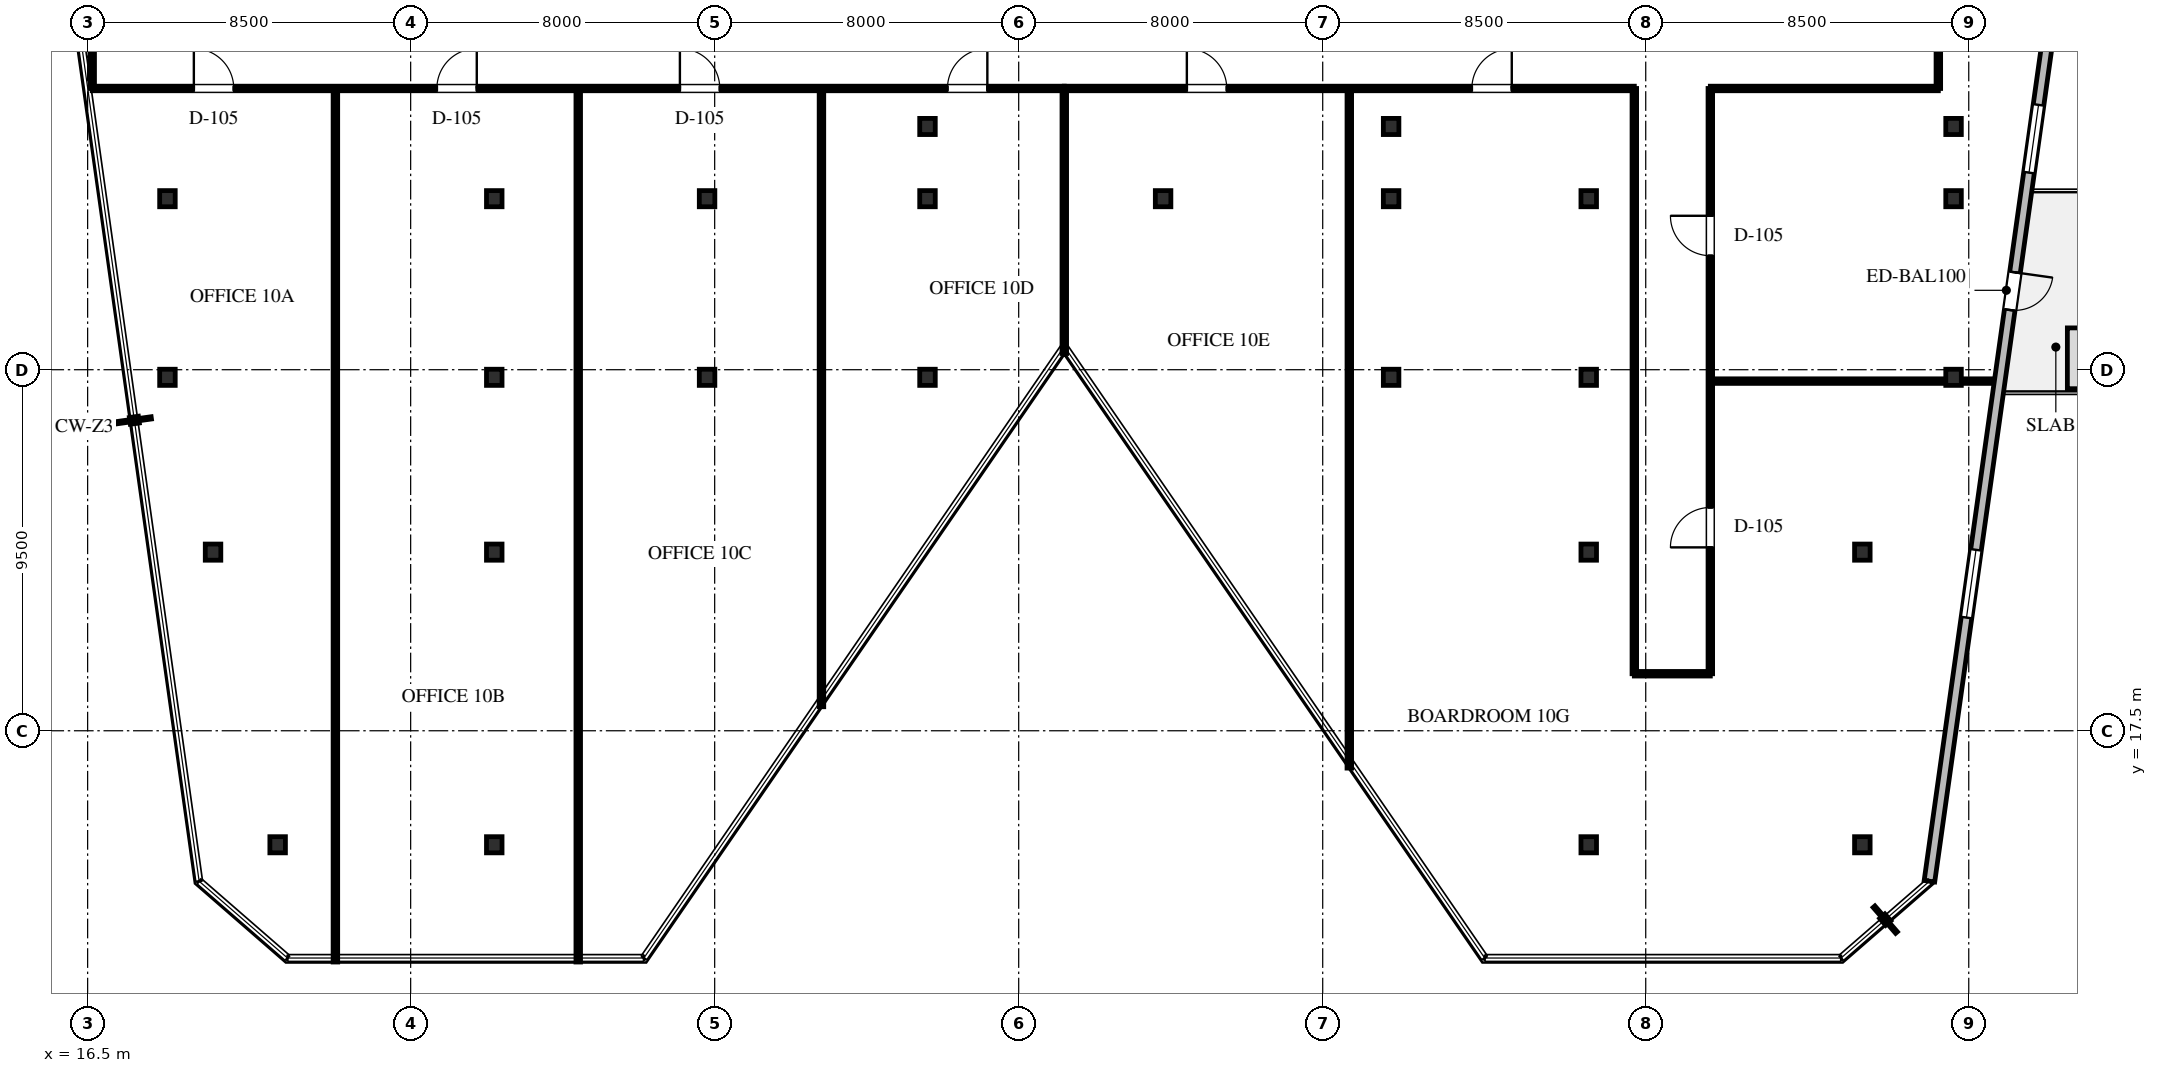
"""IFC4 building model, lengths in metres.
Left out: names, types, materials, properties, quantities, classifications, styles, units other than length and angle.
Written with IfcOpenShell. Run it as: python <this file> out.ifc"""

import sys

from ifc_helpers import new_model, si_unit, direction, frame, frame_2d, origin, origin_2d, place, context, subcontext, project, spatial, rectangle, i_section, extrude, element, fill, save


model = new_model("IFC4")
c1 = context("Model", 3, precision=1e-05, world=origin(), true_north=direction((0.0, 1.0)))
c2 = subcontext(c1, "Body", "Model", "MODEL_VIEW")
j1 = project(units=[si_unit("LENGTHUNIT", "METRE"), si_unit("PLANEANGLEUNIT", "RADIAN")], contexts=[c1])
p1 = place(None, origin())
s1 = spatial("IfcSite", under=j1, at=p1, CompositionType="ELEMENT")
p2 = place(p1, origin())
s2 = spatial("IfcBuilding", under=s1, at=p2, CompositionType="ELEMENT")
p3 = place(p2, frame((0.0, 0.0, 180.5)))
s3 = spatial("IfcBuildingStorey", under=s2, at=p3, CompositionType="ELEMENT", Elevation=180.5)
for number, where, z_axis, x_axis in (
    (1, (21.5, 14.5, 0.0), (0.0, 0.0, 1.0), (1.0, 0.0, 0.0)),
    (2, (18.6, 26.8, 0.0), (0.0, 0.0, 1.0), (1.0, 0.0, 0.0)),
    (3, (27.2, 26.8, 0.0), (0.0, 0.0, 1.0), (1.0, 0.0, 0.0)),
    (4, (32.8, 26.8, 0.0), (0.0, 0.0, 1.0), (1.0, 0.0, 0.0)),
    (5, (38.6, 26.8, 0.0), (0.0, 0.0, 1.0), (1.0, 0.0, 0.0)),
    (6, (50.8, 26.8, 0.0), (0.0, 0.0, 1.0), (1.0, 0.0, 0.0)),
    (7, (56.0, 26.8, 0.0), (0.0, 0.0, 1.0), (1.0, 0.0, 0.0)),
    (8, (65.6, 26.8, 0.0), (0.0, 0.0, 1.0), (1.0, 0.0, 0.0)),
    (9, (18.6, 31.5, 0.0), (0.0, 0.0, 1.0), (1.0, 0.0, 0.0)),
    (10, (27.2, 31.5, 0.0), (0.0, 0.0, 1.0), (1.0, 0.0, 0.0)),
    (11, (32.8, 31.5, 0.0), (0.0, 0.0, 1.0), (1.0, 0.0, 0.0)),
    (12, (27.2, 14.5, 0.0), (0.0, 0.0, 1.0), (1.0, 0.0, 0.0)),
    (13, (38.6, 31.5, 0.0), (0.0, 0.0, 1.0), (1.0, 0.0, 0.0)),
    (14, (44.8, 31.5, 0.0), (0.0, 0.0, 1.0), (1.0, 0.0, 0.0)),
    (15, (50.8, 31.5, 0.0), (0.0, 0.0, 1.0), (1.0, 0.0, 0.0)),
    (16, (56.0, 31.5, 0.0), (0.0, 0.0, 1.0), (1.0, 0.0, 0.0)),
    (17, (65.6, 31.5, 0.0), (0.0, 0.0, 1.0), (1.0, 0.0, 0.0)),
    (18, (56.0, 14.5, 0.0), (0.0, 0.0, 1.0), (1.0, 0.0, 0.0)),
    (19, (63.2, 14.5, 0.0), (0.0, 0.0, 1.0), (1.0, 0.0, 0.0)),
    (20, (19.8, 22.2, 0.0), (0.0, 0.0, 1.0), (1.0, 0.0, 0.0)),
    (21, (27.2, 22.2, 0.0), (0.0, 0.0, 1.0), (1.0, 0.0, 0.0)),
    (22, (56.0, 22.2, 0.0), (0.0, 0.0, 1.0), (1.0, 0.0, 0.0)),
    (23, (63.2, 22.2, 0.0), (0.0, 0.0, 1.0), (1.0, 0.0, 0.0)),
    (24, (38.6, 33.4, 0.0), (0.0, 0.0, 1.0), (1.0, 0.0, 0.0)),
    (25, (50.8, 33.4, 0.0), (0.0, 0.0, 1.0), (1.0, 0.0, 0.0)),
    (26, (65.6, 33.4, 0.0), (0.0, 0.0, 1.0), (1.0, 0.0, 0.0)),
):
    element("IfcColumn", number, at=place(p3, frame(where, z_axis=z_axis, x_axis=x_axis)), inside=s3, PredefinedType="COLUMN", context=c2, shape_type="SweptSolid", body=[
        extrude(i_section(OverallWidth=0.409, OverallDepth=0.425, WebThickness=0.033, FlangeThickness=0.052, FilletRadius=0.03, at=origin_2d()), origin(), (0.0, 0.0, 1.0), 4.0),
    ])
p4 = place(p3, frame((68.375, 37.8, 0.0), z_axis=(0.0, 0.0, 1.0), x_axis=(-0.139173290738, -0.99026804207, 0.0)))
e27 = element("IfcWall", 27, at=p4, inside=s3, PredefinedType="STANDARD", context=c2, shape_type="SweptSolid", body=[
    extrude(rectangle(XDim=24.498, YDim=0.28, at=frame_2d((12.249, 0.0))), origin(), (0.0, 0.0, 1.0), 3.755),
])
p5 = place(p4, frame((8.319, 0.0, 0.0)))
e28 = element("IfcOpeningElement", 28, at=p5, cuts=e27, PredefinedType="OPENING", context=c2, shape_type="SweptSolid", body=[
    extrude(rectangle(XDim=1.0, YDim=2.15, at=frame_2d((0.5, 1.075))), frame((0.0, 0.15, 0.0), z_axis=(0.0, -1.0, 0.0), x_axis=(1.0, 0.0, 0.0)), (0.0, 0.0, 1.0), 0.3),
])
p6 = place(p4, frame((3.869, 0.0, 0.65)))
e29 = element("IfcOpeningElement", 29, at=p6, cuts=e27, PredefinedType="OPENING", context=c2, shape_type="SweptSolid", body=[
    extrude(rectangle(XDim=1.8, YDim=2.1, at=frame_2d((0.9, 1.05))), frame((0.0, 0.15, 0.0), z_axis=(0.0, -1.0, 0.0), x_axis=(1.0, 0.0, 0.0)), (0.0, 0.0, 1.0), 0.3),
])
p7 = place(p4, frame((15.692, 0.0, 0.65)))
e30 = element("IfcOpeningElement", 30, at=p7, cuts=e27, PredefinedType="OPENING", context=c2, shape_type="SweptSolid", body=[
    extrude(rectangle(XDim=1.8, YDim=2.1, at=frame_2d((0.9, 1.05))), frame((0.0, 0.15, 0.0), z_axis=(0.0, -1.0, 0.0), x_axis=(1.0, 0.0, 0.0)), (0.0, 0.0, 1.0), 0.3),
])
p8 = place(p3, frame((16.62, 34.4, 0.0), z_axis=(0.0, 0.0, 1.0), x_axis=(1.0, 0.0, 0.0)))
e31 = element("IfcWall", 31, at=p8, inside=s3, PredefinedType="PARTITIONING", context=c2, shape_type="SweptSolid", body=[
    extrude(rectangle(XDim=25.58, YDim=0.12, at=frame_2d((12.79, 0.0))), origin(), (0.0, 0.0, 1.0), 2.982),
])
p9 = place(p8, frame((2.675, 0.0, 0.0)))
e32 = element("IfcOpeningElement", 32, at=p9, cuts=e31, PredefinedType="OPENING", context=c2, shape_type="SweptSolid", body=[
    extrude(rectangle(XDim=1.05, YDim=2.2, at=frame_2d((0.525, 1.1))), frame((0.0, 0.07, 0.0), z_axis=(0.0, -1.0, 0.0), x_axis=(1.0, 0.0, 0.0)), (0.0, 0.0, 1.0), 0.14),
])
p10 = place(p8, frame((9.07, 0.0, 0.0)))
e33 = element("IfcOpeningElement", 33, at=p10, cuts=e31, PredefinedType="OPENING", context=c2, shape_type="SweptSolid", body=[
    extrude(rectangle(XDim=1.05, YDim=2.2, at=frame_2d((0.525, 1.1))), frame((0.0, 0.07, 0.0), z_axis=(0.0, -1.0, 0.0), x_axis=(1.0, 0.0, 0.0)), (0.0, 0.0, 1.0), 0.14),
])
p11 = place(p8, frame((15.465, 0.0, 0.0)))
e34 = element("IfcOpeningElement", 34, at=p11, cuts=e31, PredefinedType="OPENING", context=c2, shape_type="SweptSolid", body=[
    extrude(rectangle(XDim=1.05, YDim=2.2, at=frame_2d((0.525, 1.1))), frame((0.0, 0.07, 0.0), z_axis=(0.0, -1.0, 0.0), x_axis=(1.0, 0.0, 0.0)), (0.0, 0.0, 1.0), 0.14),
])
p12 = place(p8, frame((22.505, 0.0, 0.0)))
e35 = element("IfcOpeningElement", 35, at=p12, cuts=e31, PredefinedType="OPENING", context=c2, shape_type="SweptSolid", body=[
    extrude(rectangle(XDim=1.05, YDim=2.2, at=frame_2d((0.525, 1.1))), frame((0.0, 0.07, 0.0), z_axis=(0.0, -1.0, 0.0), x_axis=(1.0, 0.0, 0.0)), (0.0, 0.0, 1.0), 0.14),
])
p13 = place(p3, frame((42.2, 34.4, 0.0), z_axis=(0.0, 0.0, 1.0), x_axis=(1.0, 0.0, 0.0)))
e36 = element("IfcWall", 36, at=p13, inside=s3, PredefinedType="PARTITIONING", context=c2, shape_type="SweptSolid", body=[
    extrude(rectangle(XDim=15.0, YDim=0.12, at=frame_2d((7.5, 0.0))), origin(), (0.0, 0.0, 1.0), 2.982),
])
p14 = place(p13, frame((3.225, 0.0, 0.0)))
e37 = element("IfcOpeningElement", 37, at=p14, cuts=e36, PredefinedType="OPENING", context=c2, shape_type="SweptSolid", body=[
    extrude(rectangle(XDim=1.05, YDim=2.2, at=frame_2d((0.525, 1.1))), frame((0.0, 0.07, 0.0), z_axis=(0.0, -1.0, 0.0), x_axis=(1.0, 0.0, 0.0)), (0.0, 0.0, 1.0), 0.14),
])
p15 = place(p13, frame((10.725, 0.0, 0.0)))
e38 = element("IfcOpeningElement", 38, at=p15, cuts=e36, PredefinedType="OPENING", context=c2, shape_type="SweptSolid", body=[
    extrude(rectangle(XDim=1.05, YDim=2.2, at=frame_2d((0.525, 1.1))), frame((0.0, 0.07, 0.0), z_axis=(0.0, -1.0, 0.0), x_axis=(1.0, 0.0, 0.0)), (0.0, 0.0, 1.0), 0.14),
])
p16 = place(p3, frame((59.2, 34.4, 0.0), z_axis=(0.0, 0.0, 1.0), x_axis=(1.0, 0.0, 0.0)))
e39 = element("IfcWall", 39, at=p16, inside=s3, PredefinedType="PARTITIONING", context=c2, shape_type="SweptSolid", body=[
    extrude(rectangle(XDim=6.0, YDim=0.12, at=frame_2d((3.0, 0.0))), origin(), (0.0, 0.0, 1.0), 3.755),
])
p17 = place(p3, frame((16.62, 34.4, 0.0), z_axis=(0.0, 0.0, 1.0), x_axis=(0.0, 1.0, 0.0)))
e40 = element("IfcWall", 40, at=p17, inside=s3, PredefinedType="PARTITIONING", context=c2, shape_type="SweptSolid", body=[
    extrude(rectangle(XDim=3.65, YDim=0.12, at=frame_2d((1.825, 0.0))), origin(), (0.0, 0.0, 1.0), 3.755),
])
p18 = place(p3, frame((65.2, 34.4, 0.0), z_axis=(0.0, 0.0, 1.0), x_axis=(0.0, 1.0, 0.0)))
e41 = element("IfcWall", 41, at=p18, inside=s3, PredefinedType="PARTITIONING", context=c2, shape_type="SweptSolid", body=[
    extrude(rectangle(XDim=3.317, YDim=0.12, at=frame_2d((1.659, 0.0))), origin(), (0.0, 0.0, 1.0), 2.982),
])
p19 = place(p3, frame((57.2, 19.0, 0.0), z_axis=(0.0, 0.0, 1.0), x_axis=(0.0, 1.0, 0.0)))
e42 = element("IfcWall", 42, at=p19, inside=s3, PredefinedType="PARTITIONING", context=c2, shape_type="SweptSolid", body=[
    extrude(rectangle(XDim=15.4, YDim=0.12, at=frame_2d((7.7, 0.0))), origin(), (0.0, 0.0, 1.0), 2.982),
])
p20 = place(p3, frame((59.2, 19.0, 0.0), z_axis=(0.0, 0.0, 1.0), x_axis=(0.0, 1.0, 0.0)))
e43 = element("IfcWall", 43, at=p20, inside=s3, PredefinedType="PARTITIONING", context=c2, shape_type="SweptSolid", body=[
    extrude(rectangle(XDim=15.4, YDim=0.12, at=frame_2d((7.7, 0.0))), origin(), (0.0, 0.0, 1.0), 2.982),
])
p21 = place(p20, frame((3.325, 0.0, 0.0)))
e44 = element("IfcOpeningElement", 44, at=p21, cuts=e43, PredefinedType="OPENING", context=c2, shape_type="SweptSolid", body=[
    extrude(rectangle(XDim=1.05, YDim=2.2, at=frame_2d((0.525, 1.1))), frame((0.0, 0.07, 0.0), z_axis=(0.0, -1.0, 0.0), x_axis=(1.0, 0.0, 0.0)), (0.0, 0.0, 1.0), 0.14),
])
p22 = place(p20, frame((11.0, 0.0, 0.0)))
e45 = element("IfcOpeningElement", 45, at=p22, cuts=e43, PredefinedType="OPENING", context=c2, shape_type="SweptSolid", body=[
    extrude(rectangle(XDim=1.05, YDim=2.2, at=frame_2d((0.525, 1.1))), frame((0.0, 0.07, 0.0), z_axis=(0.0, -1.0, 0.0), x_axis=(1.0, 0.0, 0.0)), (0.0, 0.0, 1.0), 0.14),
])
p23 = place(p3, frame((57.2, 19.0, 0.0), z_axis=(0.0, 0.0, 1.0), x_axis=(1.0, 0.0, 0.0)))
e46 = element("IfcWall", 46, at=p23, inside=s3, PredefinedType="PARTITIONING", context=c2, shape_type="SweptSolid", body=[
    extrude(rectangle(XDim=2.0, YDim=0.12, at=frame_2d((1.0, 0.0))), origin(), (0.0, 0.0, 1.0), 3.147),
])
p24 = place(p3, frame((59.268, 26.7, 0.0), z_axis=(0.0, 0.0, 1.0), x_axis=(1.0, 0.0, 0.0)))
e47 = element("IfcWall", 47, at=p24, inside=s3, PredefinedType="PARTITIONING", context=c2, shape_type="SweptSolid", body=[
    extrude(rectangle(XDim=7.38, YDim=0.12, at=frame_2d((3.69, 0.0))), origin(), (0.0, 0.0, 1.0), 2.982),
])
p25 = place(p3, frame((42.2, 27.427, 0.0), z_axis=(0.0, 0.0, 1.0), x_axis=(0.0, 1.0, 0.0)))
e48 = element("IfcWall", 48, at=p25, inside=s3, PredefinedType="PARTITIONING", context=c2, shape_type="SweptSolid", body=[
    extrude(rectangle(XDim=6.973, YDim=0.12, at=frame_2d((3.487, 0.0))), origin(), (0.0, 0.0, 1.0), 2.982),
])
for number, where, z_axis, x_axis in (
    (49, (23.02, 11.415, 0.0), (0.0, 0.0, 1.0), (0.0, 1.0, 0.0)),
    (50, (29.41, 11.415, 0.0), (0.0, 0.0, 1.0), (0.0, 1.0, 0.0)),
):
    element("IfcWall", number, at=place(p3, frame(where, z_axis=z_axis, x_axis=x_axis)), inside=s3, PredefinedType="PARTITIONING", context=c2, shape_type="SweptSolid", body=[
        extrude(rectangle(XDim=22.917, YDim=0.12, at=frame_2d((11.458, 0.0))), origin(), (0.0, 0.0, 1.0), 2.982),
    ])
p26 = place(p3, frame((35.81, 18.132, 0.0), z_axis=(0.0, 0.0, 1.0), x_axis=(0.0, 1.0, 0.0)))
e51 = element("IfcWall", 51, at=p26, inside=s3, PredefinedType="PARTITIONING", context=c2, shape_type="SweptSolid", body=[
    extrude(rectangle(XDim=16.2, YDim=0.12, at=frame_2d((8.1, 0.0))), origin(), (0.0, 0.0, 1.0), 2.982),
])
p27 = place(p3, frame((49.7, 16.517, 0.0), z_axis=(0.0, 0.0, 1.0), x_axis=(0.0, 1.0, 0.0)))
e52 = element("IfcWall", 52, at=p27, inside=s3, PredefinedType="PARTITIONING", context=c2, shape_type="SweptSolid", body=[
    extrude(rectangle(XDim=17.815, YDim=0.12, at=frame_2d((8.907, 0.0))), origin(), (0.0, 0.0, 1.0), 2.982),
])
p28 = place(p5, origin())
e53 = element("IfcDoor", 53, at=p28, inside=s3, OperationType="SINGLE_SWING_LEFT", PredefinedType="DOOR", context=c2, shape_type="SweptSolid", body=[
    extrude(rectangle(XDim=1.0, YDim=2.15, at=frame_2d((0.5, 1.075))), frame((0.0, 0.025, 0.0), z_axis=(0.0, -1.0, 0.0), x_axis=(1.0, 0.0, 0.0)), (0.0, 0.0, 1.0), 0.05),
])
fill(e28, e53)
p29 = place(p6, origin())
e54 = element("IfcWindow", 54, at=p29, inside=s3, PartitioningType="SINGLE_PANEL", PredefinedType="WINDOW", context=c2, shape_type="SweptSolid", body=[
    extrude(rectangle(XDim=1.8, YDim=2.1, at=frame_2d((0.9, 1.05))), frame((0.0, 0.03, 0.0), z_axis=(0.0, -1.0, 0.0), x_axis=(1.0, 0.0, 0.0)), (0.0, 0.0, 1.0), 0.06),
])
fill(e29, e54)
p30 = place(p7, origin())
e55 = element("IfcWindow", 55, at=p30, inside=s3, PartitioningType="SINGLE_PANEL", PredefinedType="WINDOW", context=c2, shape_type="SweptSolid", body=[
    extrude(rectangle(XDim=1.8, YDim=2.1, at=frame_2d((0.9, 1.05))), frame((0.0, 0.03, 0.0), z_axis=(0.0, -1.0, 0.0), x_axis=(1.0, 0.0, 0.0)), (0.0, 0.0, 1.0), 0.06),
])
fill(e30, e55)
p31 = place(p21, origin())
e56 = element("IfcDoor", 56, at=p31, inside=s3, OperationType="SINGLE_SWING_LEFT", PredefinedType="DOOR", context=c2, shape_type="SweptSolid", body=[
    extrude(rectangle(XDim=1.05, YDim=2.2, at=frame_2d((0.525, 1.1))), frame((0.0, 0.025, 0.0), z_axis=(0.0, -1.0, 0.0), x_axis=(1.0, 0.0, 0.0)), (0.0, 0.0, 1.0), 0.05),
])
fill(e44, e56)
p32 = place(p22, origin())
e57 = element("IfcDoor", 57, at=p32, inside=s3, OperationType="SINGLE_SWING_RIGHT", PredefinedType="DOOR", context=c2, shape_type="SweptSolid", body=[
    extrude(rectangle(XDim=1.05, YDim=2.2, at=frame_2d((0.525, 1.1))), frame((0.0, 0.025, 0.0), z_axis=(0.0, -1.0, 0.0), x_axis=(1.0, 0.0, 0.0)), (0.0, 0.0, 1.0), 0.05),
])
fill(e45, e57)
p33 = place(p9, origin())
e58 = element("IfcDoor", 58, at=p33, inside=s3, OperationType="SINGLE_SWING_LEFT", PredefinedType="DOOR", context=c2, shape_type="SweptSolid", body=[
    extrude(rectangle(XDim=1.05, YDim=2.2, at=frame_2d((0.525, 1.1))), frame((0.0, 0.025, 0.0), z_axis=(0.0, -1.0, 0.0), x_axis=(1.0, 0.0, 0.0)), (0.0, 0.0, 1.0), 0.05),
])
fill(e32, e58)
p34 = place(p10, origin())
e59 = element("IfcDoor", 59, at=p34, inside=s3, OperationType="SINGLE_SWING_RIGHT", PredefinedType="DOOR", context=c2, shape_type="SweptSolid", body=[
    extrude(rectangle(XDim=1.05, YDim=2.2, at=frame_2d((0.525, 1.1))), frame((0.0, 0.025, 0.0), z_axis=(0.0, -1.0, 0.0), x_axis=(1.0, 0.0, 0.0)), (0.0, 0.0, 1.0), 0.05),
])
fill(e33, e59)
p35 = place(p11, origin())
e60 = element("IfcDoor", 60, at=p35, inside=s3, OperationType="SINGLE_SWING_LEFT", PredefinedType="DOOR", context=c2, shape_type="SweptSolid", body=[
    extrude(rectangle(XDim=1.05, YDim=2.2, at=frame_2d((0.525, 1.1))), frame((0.0, 0.025, 0.0), z_axis=(0.0, -1.0, 0.0), x_axis=(1.0, 0.0, 0.0)), (0.0, 0.0, 1.0), 0.05),
])
fill(e34, e60)
p36 = place(p12, origin())
e61 = element("IfcDoor", 61, at=p36, inside=s3, OperationType="SINGLE_SWING_RIGHT", PredefinedType="DOOR", context=c2, shape_type="SweptSolid", body=[
    extrude(rectangle(XDim=1.05, YDim=2.2, at=frame_2d((0.525, 1.1))), frame((0.0, 0.025, 0.0), z_axis=(0.0, -1.0, 0.0), x_axis=(1.0, 0.0, 0.0)), (0.0, 0.0, 1.0), 0.05),
])
fill(e35, e61)
p37 = place(p14, origin())
e62 = element("IfcDoor", 62, at=p37, inside=s3, OperationType="SINGLE_SWING_LEFT", PredefinedType="DOOR", context=c2, shape_type="SweptSolid", body=[
    extrude(rectangle(XDim=1.05, YDim=2.2, at=frame_2d((0.525, 1.1))), frame((0.0, 0.025, 0.0), z_axis=(0.0, -1.0, 0.0), x_axis=(1.0, 0.0, 0.0)), (0.0, 0.0, 1.0), 0.05),
])
fill(e37, e62)
p38 = place(p15, origin())
e63 = element("IfcDoor", 63, at=p38, inside=s3, OperationType="SINGLE_SWING_RIGHT", PredefinedType="DOOR", context=c2, shape_type="SweptSolid", body=[
    extrude(rectangle(XDim=1.05, YDim=2.2, at=frame_2d((0.525, 1.1))), frame((0.0, 0.025, 0.0), z_axis=(0.0, -1.0, 0.0), x_axis=(1.0, 0.0, 0.0)), (0.0, 0.0, 1.0), 0.05),
])
fill(e38, e63)
save(model, sys.argv[1])
